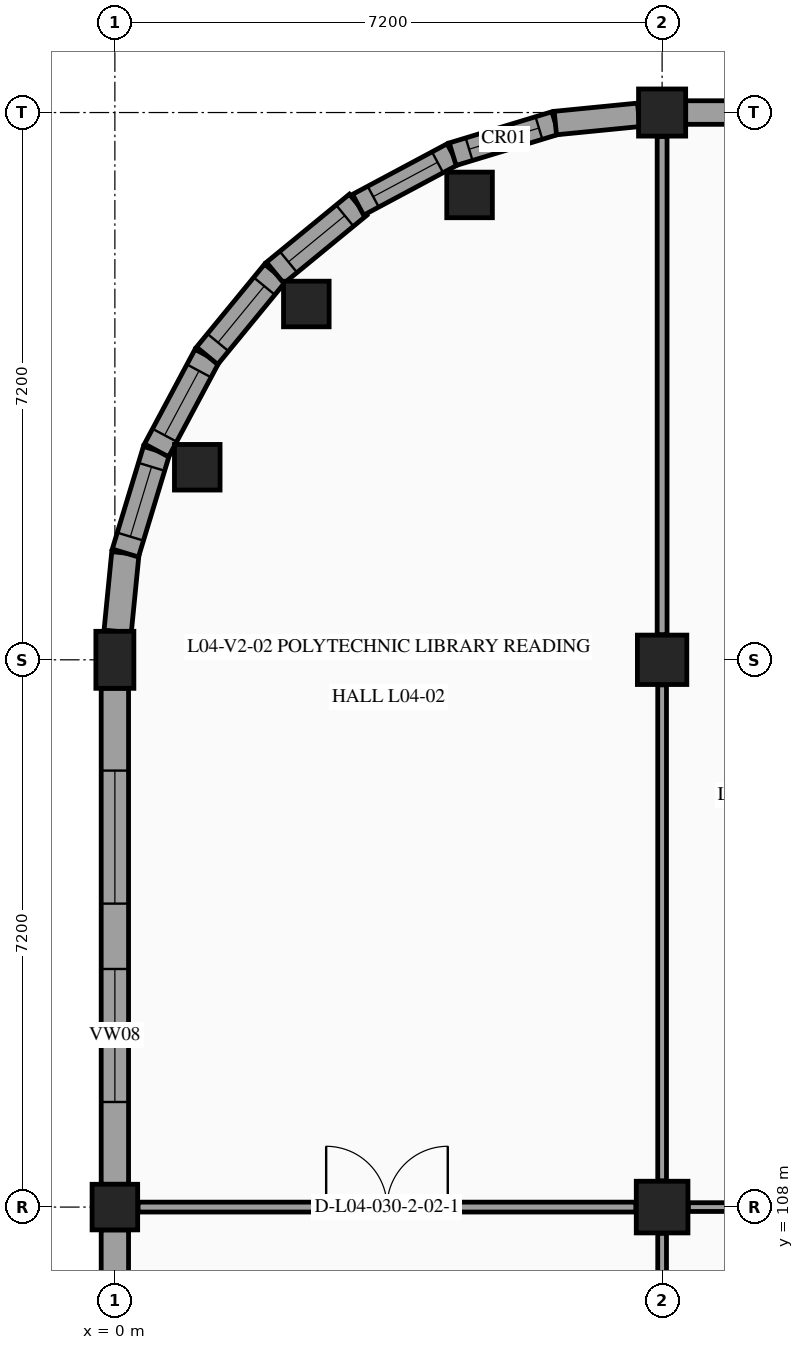
"""IFC4 building model, lengths in metres.
Left out: names, types, materials, properties, quantities, classifications, styles, units other than length and angle.
Written with IfcOpenShell. Run it as: python <this file> out.ifc"""

import sys

from ifc_helpers import new_model, si_unit, direction, frame, frame_2d, origin, origin_2d, place, context, subcontext, project, spatial, rectangle, circle, extrude, element, fill, save


model = new_model("IFC4")
c1 = context("Model", 3, precision=1e-05, world=origin(), true_north=direction((0.0, 1.0)))
c2 = subcontext(c1, "Body", "Model", "MODEL_VIEW")
j1 = project(units=[si_unit("LENGTHUNIT", "METRE"), si_unit("PLANEANGLEUNIT", "RADIAN")], contexts=[c1])
p1 = place(None, origin())
s1 = spatial("IfcSite", under=j1, at=p1, CompositionType="ELEMENT")
p2 = place(p1, origin())
s2 = spatial("IfcBuilding", under=s1, at=p2, CompositionType="ELEMENT")
p3 = place(p2, frame((0.0, 0.0, 18.6)))
s3 = spatial("IfcBuildingStorey", under=s2, at=p3, CompositionType="ELEMENT", Elevation=18.6)
p4 = place(p3, frame((0.0, 108.0, 0.0), z_axis=(0.0, 0.0, 1.0), x_axis=(1.0, 0.0, 0.0)))
e1 = element("IfcColumn", 1, at=p4, inside=s3, PredefinedType="COLUMN", context=c2, shape_type="SweptSolid", body=[
    extrude(rectangle(XDim=0.6, YDim=0.6, at=origin_2d()), origin(), (0.0, 0.0, 1.0), 4.2),
])
p5 = place(p3, frame((0.0, 115.2, 0.0), z_axis=(0.0, 0.0, 1.0), x_axis=(1.0, 0.0, 0.0)))
e2 = element("IfcColumn", 2, at=p5, inside=s3, PredefinedType="COLUMN", context=c2, shape_type="SweptSolid", body=[
    extrude(rectangle(XDim=0.5, YDim=0.75, at=origin_2d()), origin(), (0.0, 0.0, 1.0), 4.2),
])
p6 = place(p3, frame((7.2, 108.0, 0.0), z_axis=(0.0, 0.0, 1.0), x_axis=(1.0, 0.0, 0.0)))
e3 = element("IfcColumn", 3, at=p6, inside=s3, PredefinedType="COLUMN", context=c2, shape_type="SweptSolid", body=[
    extrude(rectangle(XDim=0.68, YDim=0.68, at=origin_2d()), origin(), (0.0, 0.0, 1.0), 4.2),
])
p7 = place(p3, frame((7.2, 115.2, 0.0), z_axis=(0.0, 0.0, 1.0), x_axis=(1.0, 0.0, 0.0)))
e4 = element("IfcColumn", 4, at=p7, inside=s3, PredefinedType="COLUMN", context=c2, shape_type="SweptSolid", body=[
    extrude(rectangle(XDim=0.65, YDim=0.65, at=origin_2d()), origin(), (0.0, 0.0, 1.0), 4.2),
])
p8 = place(p3, frame((7.2, 122.4, 0.0), z_axis=(0.0, 0.0, 1.0), x_axis=(1.0, 0.0, 0.0)))
e5 = element("IfcColumn", 5, at=p8, inside=s3, PredefinedType="COLUMN", context=c2, shape_type="SweptSolid", body=[
    extrude(rectangle(XDim=0.62, YDim=0.62, at=origin_2d()), origin(), (0.0, 0.0, 1.0), 4.2),
])
for number, where, z_axis, x_axis in (
    (6, (4.667, 121.316, 0.0), (0.0, 0.0, 1.0), (1.0, 0.0, 0.0)),
    (7, (2.519, 119.881, 0.0), (0.0, 0.0, 1.0), (1.0, 0.0, 0.0)),
    (8, (1.084, 117.733, 0.0), (0.0, 0.0, 1.0), (1.0, 0.0, 0.0)),
):
    element("IfcColumn", number, at=place(p3, frame(where, z_axis=z_axis, x_axis=x_axis)), inside=s3, PredefinedType="COLUMN", context=c2, shape_type="SweptSolid", body=[
        extrude(circle(Radius=0.3, at=origin_2d()), origin(), (0.0, 0.0, 1.0), 4.2),
    ])
p9 = place(p3, frame((0.0, 101.11, 0.0), z_axis=(0.0, 0.0, 1.0), x_axis=(0.0, 1.0, 0.0)))
e9 = element("IfcWall", 9, at=p9, inside=s3, PredefinedType="STANDARD", context=c2, shape_type="SweptSolid", body=[
    extrude(rectangle(XDim=6.59, YDim=0.36, at=frame_2d((3.295, 0.0))), origin(), (0.0, 0.0, 1.0), 3.15),
])
p10 = place(p9, frame((1.002, 0.0, 1.15)))
e10 = element("IfcOpeningElement", 10, at=p10, cuts=e9, PredefinedType="OPENING", context=c2, shape_type="SweptSolid", body=[
    extrude(rectangle(XDim=1.95, YDim=1.4, at=frame_2d((0.975, 0.7))), frame((0.0, 0.19, 0.0), z_axis=(0.0, -1.0, 0.0), x_axis=(1.0, 0.0, 0.0)), (0.0, 0.0, 1.0), 0.38),
])
p11 = place(p9, frame((3.638, 0.0, 1.15)))
e11 = element("IfcOpeningElement", 11, at=p11, cuts=e9, PredefinedType="OPENING", context=c2, shape_type="SweptSolid", body=[
    extrude(rectangle(XDim=1.95, YDim=1.4, at=frame_2d((0.975, 0.7))), frame((0.0, 0.19, 0.0), z_axis=(0.0, -1.0, 0.0), x_axis=(1.0, 0.0, 0.0)), (0.0, 0.0, 1.0), 0.38),
])
p12 = place(p3, frame((0.0, 108.3, 0.0), z_axis=(0.0, 0.0, 1.0), x_axis=(0.0, 1.0, 0.0)))
e12 = element("IfcWall", 12, at=p12, inside=s3, PredefinedType="STANDARD", context=c2, shape_type="SweptSolid", body=[
    extrude(rectangle(XDim=6.525, YDim=0.36, at=frame_2d((3.262, 0.0))), origin(), (0.0, 0.0, 1.0), 3.15),
])
p13 = place(p12, frame((1.083, 0.0, 1.15)))
e13 = element("IfcOpeningElement", 13, at=p13, cuts=e12, PredefinedType="OPENING", context=c2, shape_type="SweptSolid", body=[
    extrude(rectangle(XDim=1.75, YDim=1.4, at=frame_2d((0.875, 0.7))), frame((0.0, 0.19, 0.0), z_axis=(0.0, -1.0, 0.0), x_axis=(1.0, 0.0, 0.0)), (0.0, 0.0, 1.0), 0.38),
])
p14 = place(p12, frame((3.692, 0.0, 1.15)))
e14 = element("IfcOpeningElement", 14, at=p14, cuts=e12, PredefinedType="OPENING", context=c2, shape_type="SweptSolid", body=[
    extrude(rectangle(XDim=1.75, YDim=1.4, at=frame_2d((0.875, 0.7))), frame((0.0, 0.19, 0.0), z_axis=(0.0, -1.0, 0.0), x_axis=(1.0, 0.0, 0.0)), (0.0, 0.0, 1.0), 0.38),
])
p15 = place(p3, frame((0.037, 115.573, 0.0), z_axis=(0.0, 0.0, 1.0), x_axis=(0.097987704654, 0.995187625394, 0.0)))
e15 = element("IfcWall", 15, at=p15, inside=s3, PredefinedType="STANDARD", context=c2, shape_type="SweptSolid", body=[
    extrude(rectangle(XDim=1.036, YDim=0.36, at=frame_2d((0.518, 0.0))), origin(), (0.0, 0.0, 1.0), 3.955),
])
p16 = place(p3, frame((0.138, 116.605, 0.0), z_axis=(0.0, 0.0, 1.0), x_axis=(0.290266641956, 0.956945806495, 0.0)))
e16 = element("IfcWall", 16, at=p16, inside=s3, PredefinedType="STANDARD", context=c2, shape_type="SweptSolid", body=[
    extrude(rectangle(XDim=1.411, YDim=0.36, at=frame_2d((0.706, 0.0))), origin(), (0.0, 0.0, 1.0), 3.955),
])
p17 = place(p16, frame((0.226, 0.0, 1.0)))
e17 = element("IfcOpeningElement", 17, at=p17, cuts=e16, PredefinedType="OPENING", context=c2, shape_type="SweptSolid", body=[
    extrude(rectangle(XDim=0.96, YDim=1.4, at=frame_2d((0.48, 0.7))), frame((0.0, 0.19, 0.0), z_axis=(0.0, -1.0, 0.0), x_axis=(1.0, 0.0, 0.0)), (0.0, 0.0, 1.0), 0.38),
])
p18 = place(p3, frame((0.548, 117.955, 0.0), z_axis=(0.0, 0.0, 1.0), x_axis=(0.471333199182, 0.881955222984, 0.0)))
e18 = element("IfcWall", 18, at=p18, inside=s3, PredefinedType="STANDARD", context=c2, shape_type="SweptSolid", body=[
    extrude(rectangle(XDim=1.411, YDim=0.36, at=frame_2d((0.706, 0.0))), origin(), (0.0, 0.0, 1.0), 3.955),
])
p19 = place(p18, frame((0.226, 0.0, 1.0)))
e19 = element("IfcOpeningElement", 19, at=p19, cuts=e18, PredefinedType="OPENING", context=c2, shape_type="SweptSolid", body=[
    extrude(rectangle(XDim=0.96, YDim=1.4, at=frame_2d((0.48, 0.7))), frame((0.0, 0.19, 0.0), z_axis=(0.0, -1.0, 0.0), x_axis=(1.0, 0.0, 0.0)), (0.0, 0.0, 1.0), 0.38),
])
p20 = place(p3, frame((1.213, 119.2, 0.0), z_axis=(0.0, 0.0, 1.0), x_axis=(0.634433227965, 0.772977670605, 0.0)))
e20 = element("IfcWall", 20, at=p20, inside=s3, PredefinedType="STANDARD", context=c2, shape_type="SweptSolid", body=[
    extrude(rectangle(XDim=1.412, YDim=0.36, at=frame_2d((0.706, 0.0))), origin(), (0.0, 0.0, 1.0), 3.955),
])
p21 = place(p20, frame((0.226, 0.0, 1.0)))
e21 = element("IfcOpeningElement", 21, at=p21, cuts=e20, PredefinedType="OPENING", context=c2, shape_type="SweptSolid", body=[
    extrude(rectangle(XDim=0.96, YDim=1.4, at=frame_2d((0.48, 0.7))), frame((0.0, 0.19, 0.0), z_axis=(0.0, -1.0, 0.0), x_axis=(1.0, 0.0, 0.0)), (0.0, 0.0, 1.0), 0.38),
])
p22 = place(p3, frame((2.109, 120.291, 0.0), z_axis=(0.0, 0.0, 1.0), x_axis=(0.773062495189, 0.63432986571, 0.0)))
e22 = element("IfcWall", 22, at=p22, inside=s3, PredefinedType="STANDARD", context=c2, shape_type="SweptSolid", body=[
    extrude(rectangle(XDim=1.411, YDim=0.36, at=frame_2d((0.706, 0.0))), origin(), (0.0, 0.0, 1.0), 3.955),
])
p23 = place(p22, frame((0.226, 0.0, 1.0)))
e23 = element("IfcOpeningElement", 23, at=p23, cuts=e22, PredefinedType="OPENING", context=c2, shape_type="SweptSolid", body=[
    extrude(rectangle(XDim=0.96, YDim=1.4, at=frame_2d((0.48, 0.7))), frame((0.0, 0.19, 0.0), z_axis=(0.0, -1.0, 0.0), x_axis=(1.0, 0.0, 0.0)), (0.0, 0.0, 1.0), 0.38),
])
p24 = place(p3, frame((3.2, 121.187, 0.0), z_axis=(0.0, 0.0, 1.0), x_axis=(0.881844864465, 0.471539643102, 0.0)))
e24 = element("IfcWall", 24, at=p24, inside=s3, PredefinedType="STANDARD", context=c2, shape_type="SweptSolid", body=[
    extrude(rectangle(XDim=1.411, YDim=0.31, at=frame_2d((0.706, 0.0))), origin(), (0.0, 0.0, 1.0), 3.955),
])
p25 = place(p24, frame((0.226, 0.0, 1.0)))
e25 = element("IfcOpeningElement", 25, at=p25, cuts=e24, PredefinedType="OPENING", context=c2, shape_type="SweptSolid", body=[
    extrude(rectangle(XDim=0.96, YDim=1.4, at=frame_2d((0.48, 0.7))), frame((0.0, 0.165, 0.0), z_axis=(0.0, -1.0, 0.0), x_axis=(1.0, 0.0, 0.0)), (0.0, 0.0, 1.0), 0.33),
])
p26 = place(p3, frame((4.445, 121.852, 0.0), z_axis=(0.0, 0.0, 1.0), x_axis=(0.95696037757, 0.290218599957, 0.0)))
e26 = element("IfcWall", 26, at=p26, inside=s3, PredefinedType="STANDARD", context=c2, shape_type="SweptSolid", body=[
    extrude(rectangle(XDim=1.412, YDim=0.31, at=frame_2d((0.706, 0.0))), origin(), (0.0, 0.0, 1.0), 3.955),
])
p27 = place(p26, frame((0.226, 0.0, 1.0)))
e27 = element("IfcOpeningElement", 27, at=p27, cuts=e26, PredefinedType="OPENING", context=c2, shape_type="SweptSolid", body=[
    extrude(rectangle(XDim=0.96, YDim=1.4, at=frame_2d((0.48, 0.7))), frame((0.0, 0.165, 0.0), z_axis=(0.0, -1.0, 0.0), x_axis=(1.0, 0.0, 0.0)), (0.0, 0.0, 1.0), 0.33),
])
p28 = place(p3, frame((5.795, 122.262, 0.0), z_axis=(0.0, 0.0, 1.0), x_axis=(0.99518962033, 0.097967441467, 0.0)))
e28 = element("IfcWall", 28, at=p28, inside=s3, PredefinedType="STANDARD", context=c2, shape_type="SweptSolid", body=[
    extrude(rectangle(XDim=1.102, YDim=0.31, at=frame_2d((0.551, 0.0))), origin(), (0.0, 0.0, 1.0), 3.955),
])
p29 = place(p3, frame((7.51, 122.4, 0.0), z_axis=(0.0, 0.0, 1.0), x_axis=(1.0, 0.0, 0.0)))
e29 = element("IfcWall", 29, at=p29, inside=s3, PredefinedType="STANDARD", context=c2, shape_type="SweptSolid", body=[
    extrude(rectangle(XDim=6.68, YDim=0.31, at=frame_2d((3.34, 0.0))), origin(), (0.0, 0.0, 1.0), 3.2),
])
p30 = place(p29, frame((2.09, 0.0, 0.98)))
e30 = element("IfcOpeningElement", 30, at=p30, cuts=e29, PredefinedType="OPENING", context=c2, shape_type="SweptSolid", body=[
    extrude(rectangle(XDim=2.5, YDim=1.35, at=frame_2d((1.25, 0.675))), frame((0.0, 0.165, 0.0), z_axis=(0.0, -1.0, 0.0), x_axis=(1.0, 0.0, 0.0)), (0.0, 0.0, 1.0), 0.33),
])
p31 = place(p3, frame((7.2, 101.125, 0.0), z_axis=(0.0, 0.0, 1.0), x_axis=(0.0, 1.0, 0.0)))
e31 = element("IfcWall", 31, at=p31, inside=s3, PredefinedType="PARTITIONING", context=c2, shape_type="SweptSolid", body=[
    extrude(rectangle(XDim=6.53, YDim=0.115, at=frame_2d((3.265, 0.0))), origin(), (0.0, 0.0, 1.0), 3.26),
])
p32 = place(p3, frame((0.305, 108.0, 0.0), z_axis=(0.0, 0.0, 1.0), x_axis=(1.0, 0.0, 0.0)))
e32 = element("IfcWall", 32, at=p32, inside=s3, PredefinedType="PARTITIONING", context=c2, shape_type="SweptSolid", body=[
    extrude(rectangle(XDim=6.55, YDim=0.13, at=frame_2d((3.275, 0.0))), origin(), (0.0, 0.0, 1.0), 3.235),
])
p33 = place(p32, frame((2.475, 0.0, 0.0)))
e33 = element("IfcOpeningElement", 33, at=p33, cuts=e32, PredefinedType="OPENING", context=c2, shape_type="SweptSolid", body=[
    extrude(rectangle(XDim=1.6, YDim=2.2, at=frame_2d((0.8, 1.1))), frame((0.0, 0.075, 0.0), z_axis=(0.0, -1.0, 0.0), x_axis=(1.0, 0.0, 0.0)), (0.0, 0.0, 1.0), 0.15),
])
p34 = place(p3, frame((7.2, 108.345, 0.0), z_axis=(0.0, 0.0, 1.0), x_axis=(0.0, 1.0, 0.0)))
e34 = element("IfcWall", 34, at=p34, inside=s3, PredefinedType="PARTITIONING", context=c2, shape_type="SweptSolid", body=[
    extrude(rectangle(XDim=6.525, YDim=0.115, at=frame_2d((3.263, 0.0))), origin(), (0.0, 0.0, 1.0), 3.26),
])
p35 = place(p3, frame((7.2, 115.53, 0.0), z_axis=(0.0, 0.0, 1.0), x_axis=(0.0, 1.0, 0.0)))
e35 = element("IfcWall", 35, at=p35, inside=s3, PredefinedType="PARTITIONING", context=c2, shape_type="SweptSolid", body=[
    extrude(rectangle(XDim=6.555, YDim=0.13, at=frame_2d((3.277, 0.0))), origin(), (0.0, 0.0, 1.0), 3.325),
])
p36 = place(p3, frame((7.545, 108.0, 0.0), z_axis=(0.0, 0.0, 1.0), x_axis=(1.0, 0.0, 0.0)))
e36 = element("IfcWall", 36, at=p36, inside=s3, PredefinedType="PARTITIONING", context=c2, shape_type="SweptSolid", body=[
    extrude(rectangle(XDim=6.55, YDim=0.115, at=frame_2d((3.275, 0.0))), origin(), (0.0, 0.0, 1.0), 3.255),
])
p37 = place(p36, frame((2.535, 0.0, 0.0)))
e37 = element("IfcOpeningElement", 37, at=p37, cuts=e36, PredefinedType="OPENING", context=c2, shape_type="SweptSolid", body=[
    extrude(rectangle(XDim=1.48, YDim=2.28, at=frame_2d((0.74, 1.14))), frame((0.0, 0.067, 0.0), z_axis=(0.0, -1.0, 0.0), x_axis=(1.0, 0.0, 0.0)), (0.0, 0.0, 1.0), 0.135),
])
p38 = place(p13, origin())
e38 = element("IfcWindow", 38, at=p38, inside=s3, PartitioningType="SINGLE_PANEL", PredefinedType="WINDOW", context=c2, shape_type="SweptSolid", body=[
    extrude(rectangle(XDim=1.75, YDim=1.4, at=frame_2d((0.875, 0.7))), frame((0.0, -0.08, 0.0), z_axis=(0.0, -1.0, 0.0), x_axis=(1.0, 0.0, 0.0)), (0.0, 0.0, 1.0), 0.06),
])
fill(e13, e38)
p39 = place(p14, origin())
e39 = element("IfcWindow", 39, at=p39, inside=s3, PartitioningType="SINGLE_PANEL", PredefinedType="WINDOW", context=c2, shape_type="SweptSolid", body=[
    extrude(rectangle(XDim=1.75, YDim=1.4, at=frame_2d((0.875, 0.7))), frame((0.0, -0.08, 0.0), z_axis=(0.0, -1.0, 0.0), x_axis=(1.0, 0.0, 0.0)), (0.0, 0.0, 1.0), 0.06),
])
fill(e14, e39)
p40 = place(p17, origin())
e40 = element("IfcWindow", 40, at=p40, inside=s3, PartitioningType="SINGLE_PANEL", PredefinedType="WINDOW", context=c2, shape_type="SweptSolid", body=[
    extrude(rectangle(XDim=0.96, YDim=1.4, at=frame_2d((0.48, 0.7))), frame((0.0, -0.01, 0.0), z_axis=(0.0, -1.0, 0.0), x_axis=(1.0, 0.0, 0.0)), (0.0, 0.0, 1.0), 0.06),
])
fill(e17, e40)
p41 = place(p19, origin())
e41 = element("IfcWindow", 41, at=p41, inside=s3, PartitioningType="SINGLE_PANEL", PredefinedType="WINDOW", context=c2, shape_type="SweptSolid", body=[
    extrude(rectangle(XDim=0.96, YDim=1.4, at=frame_2d((0.48, 0.7))), frame((0.0, -0.01, 0.0), z_axis=(0.0, -1.0, 0.0), x_axis=(1.0, 0.0, 0.0)), (0.0, 0.0, 1.0), 0.06),
])
fill(e19, e41)
p42 = place(p21, origin())
e42 = element("IfcWindow", 42, at=p42, inside=s3, PartitioningType="SINGLE_PANEL", PredefinedType="WINDOW", context=c2, shape_type="SweptSolid", body=[
    extrude(rectangle(XDim=0.96, YDim=1.4, at=frame_2d((0.48, 0.7))), frame((0.0, -0.01, 0.0), z_axis=(0.0, -1.0, 0.0), x_axis=(1.0, 0.0, 0.0)), (0.0, 0.0, 1.0), 0.06),
])
fill(e21, e42)
p43 = place(p23, origin())
e43 = element("IfcWindow", 43, at=p43, inside=s3, PartitioningType="SINGLE_PANEL", PredefinedType="WINDOW", context=c2, shape_type="SweptSolid", body=[
    extrude(rectangle(XDim=0.96, YDim=1.4, at=frame_2d((0.48, 0.7))), frame((0.0, -0.01, 0.0), z_axis=(0.0, -1.0, 0.0), x_axis=(1.0, 0.0, 0.0)), (0.0, 0.0, 1.0), 0.06),
])
fill(e23, e43)
p44 = place(p25, origin())
e44 = element("IfcWindow", 44, at=p44, inside=s3, PartitioningType="SINGLE_PANEL", PredefinedType="WINDOW", context=c2, shape_type="SweptSolid", body=[
    extrude(rectangle(XDim=0.96, YDim=1.4, at=frame_2d((0.48, 0.7))), frame((0.0, -0.01, 0.0), z_axis=(0.0, -1.0, 0.0), x_axis=(1.0, 0.0, 0.0)), (0.0, 0.0, 1.0), 0.06),
])
fill(e25, e44)
p45 = place(p27, origin())
e45 = element("IfcWindow", 45, at=p45, inside=s3, PartitioningType="SINGLE_PANEL", PredefinedType="WINDOW", context=c2, shape_type="SweptSolid", body=[
    extrude(rectangle(XDim=0.96, YDim=1.4, at=frame_2d((0.48, 0.7))), frame((0.0, -0.01, 0.0), z_axis=(0.0, -1.0, 0.0), x_axis=(1.0, 0.0, 0.0)), (0.0, 0.0, 1.0), 0.06),
])
fill(e27, e45)
p46 = place(p33, origin())
e46 = element("IfcDoor", 46, at=p46, inside=s3, OperationType="DOUBLE_DOOR_SINGLE_SWING", PredefinedType="DOOR", context=c2, shape_type="SweptSolid", body=[
    extrude(rectangle(XDim=1.6, YDim=2.2, at=frame_2d((0.8, 1.1))), frame((0.0, 0.025, 0.0), z_axis=(0.0, -1.0, 0.0), x_axis=(1.0, 0.0, 0.0)), (0.0, 0.0, 1.0), 0.05),
])
fill(e33, e46)
save(model, sys.argv[1])
